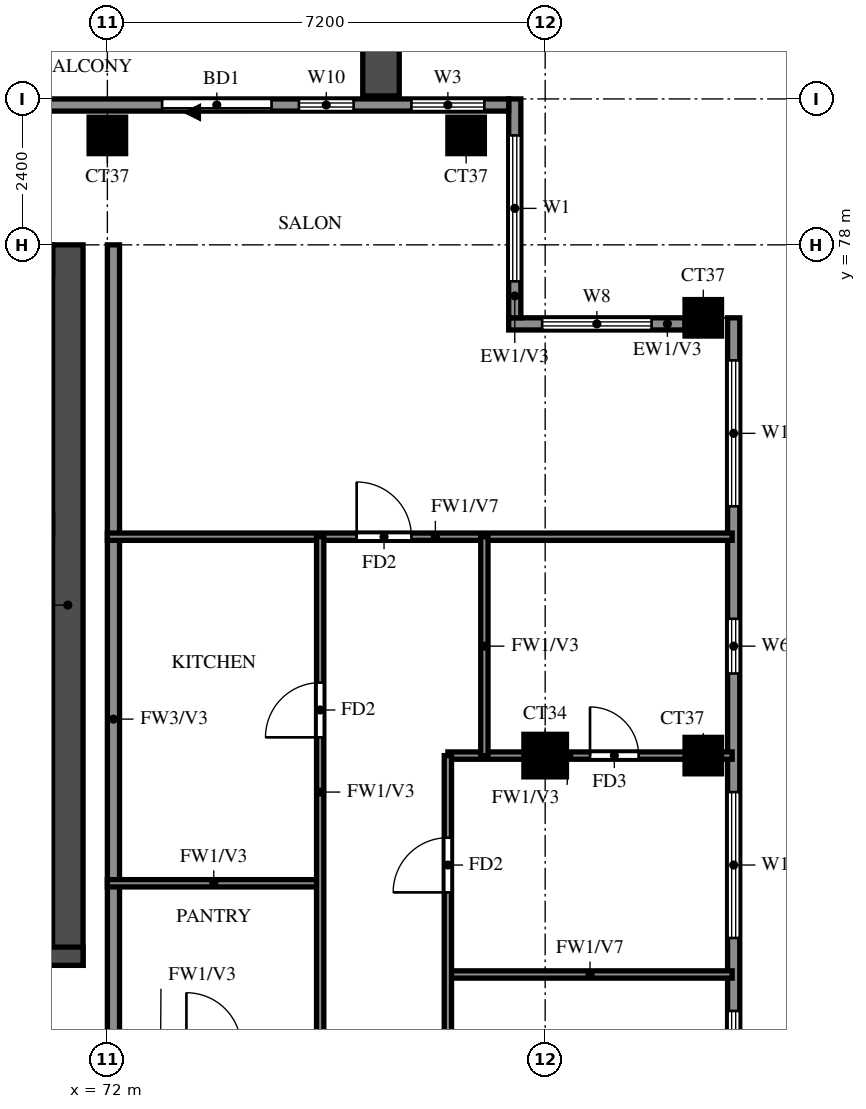
"""IFC4 building model, lengths in metres.
Left out: names, types, materials, properties, quantities, classifications, styles, units other than length and angle.
Written with IfcOpenShell. Run it as: python <this file> out.ifc"""

import sys

from ifc_helpers import new_model, si_unit, direction, frame, frame_2d, origin, origin_2d, place, context, subcontext, project, spatial, rectangle, extrude, source, transform, mapped, element, fill, save


model = new_model("IFC4")
c1 = context("Model", 3, precision=1e-05, world=origin(), true_north=direction((0.0, 1.0)))
c2 = subcontext(c1, "Body", "Model", "MODEL_VIEW")
j1 = project(units=[si_unit("LENGTHUNIT", "METRE"), si_unit("PLANEANGLEUNIT", "RADIAN")], contexts=[c1])
p1 = place(None, origin())
s1 = spatial("IfcSite", under=j1, at=p1, CompositionType="ELEMENT")
p2 = place(p1, origin())
s2 = spatial("IfcBuilding", under=s1, at=p2, CompositionType="ELEMENT")
p3 = place(p2, frame((0.0, 0.0, 260.5)))
s3 = spatial("IfcBuildingStorey", under=s2, at=p3, CompositionType="ELEMENT", Elevation=260.5)
m1 = source(origin(), c2, "Body", "SweptSolid", [
    extrude(rectangle(XDim=0.7, YDim=0.7, at=origin_2d()), origin(), (0.0, 0.0, 1.0), 3.22),
])
p4 = place(p3, frame((79.2, 69.6, 0.0), z_axis=(0.0, 0.0, 1.0), x_axis=(1.0, 0.0, 0.0)))
e1 = element("IfcColumn", 1, at=p4, inside=s3, PredefinedType="COLUMN", context=c2, shape_type="MappedRepresentation", body=[
    mapped(m1, transform((0.0, 0.0, 0.0))),
])
m2 = source(origin(), c2, "Body", "SweptSolid", [
    extrude(rectangle(XDim=0.6, YDim=0.6, at=origin_2d()), origin(), (0.0, 0.0, 1.0), 3.22),
])
for number, where, z_axis, x_axis in (
    (2, (81.8, 69.6, 0.0), (0.0, 0.0, 1.0), (1.0, 0.0, 0.0)),
    (3, (81.8, 76.8, 0.0), (0.0, 0.0, 1.0), (1.0, 0.0, 0.0)),
    (4, (72.0, 79.8, 0.0), (0.0, 0.0, 1.0), (1.0, 0.0, 0.0)),
    (5, (77.9, 79.8, 0.0), (0.0, 0.0, 1.0), (1.0, 0.0, 0.0)),
):
    element("IfcColumn", number, at=place(p3, frame(where, z_axis=z_axis, x_axis=x_axis)), inside=s3, PredefinedType="COLUMN", context=c2, shape_type="MappedRepresentation", body=[
        mapped(m2, transform((0.0, 0.0, 0.0))),
    ])
p5 = place(p3, frame((71.35, 66.15, 0.0), z_axis=(0.0, 0.0, 1.0), x_axis=(0.0, 1.0, 0.0)))
e6 = element("IfcWall", 6, at=p5, inside=s3, PredefinedType="SHEAR", context=c2, shape_type="SweptSolid", body=[
    extrude(rectangle(XDim=11.85, YDim=0.5, at=frame_2d((5.925, 0.0))), origin(), (0.0, 0.0, 1.0), 3.22),
])
p6 = place(p3, frame((29.7, 77.75, 0.0), z_axis=(0.0, 0.0, 1.0), x_axis=(1.0, 0.0, 0.0)))
e7 = element("IfcWall", 7, at=p6, inside=s3, PredefinedType="SHEAR", context=c2, shape_type="SweptSolid", body=[
    extrude(rectangle(XDim=41.4, YDim=0.5, at=frame_2d((20.7, 0.0))), origin(), (0.0, 0.0, 1.0), 3.22),
])
p7 = place(p3, frame((29.2, 66.3, 0.0), z_axis=(0.0, 0.0, 1.0), x_axis=(1.0, 0.0, 0.0)))
e8 = element("IfcWall", 8, at=p7, inside=s3, PredefinedType="SHEAR", context=c2, shape_type="SweptSolid", body=[
    extrude(rectangle(XDim=42.4, YDim=0.3, at=frame_2d((21.2, 0.0))), origin(), (0.0, 0.0, 1.0), 3.22),
])
p8 = place(p7, frame((1.425, 0.0, 0.0)))
e9 = element("IfcOpeningElement", 9, at=p8, cuts=e8, PredefinedType="OPENING", context=c2, shape_type="SweptSolid", body=[
    extrude(rectangle(XDim=1.1, YDim=2.1, at=frame_2d((0.55, 1.05))), frame((0.0, 0.16, 0.0), z_axis=(0.0, -1.0, 0.0), x_axis=(1.0, 0.0, 0.0)), (0.0, 0.0, 1.0), 0.32),
])
p9 = place(p7, frame((4.2, 0.0, 0.0)))
e10 = element("IfcOpeningElement", 10, at=p9, cuts=e8, PredefinedType="OPENING", context=c2, shape_type="SweptSolid", body=[
    extrude(rectangle(XDim=1.8, YDim=2.1, at=frame_2d((0.9, 1.05))), frame((0.0, 0.16, 0.0), z_axis=(0.0, -1.0, 0.0), x_axis=(1.0, 0.0, 0.0)), (0.0, 0.0, 1.0), 0.32),
])
p10 = place(p3, frame((82.3, 48.2, 0.0), z_axis=(0.0, 0.0, 1.0), x_axis=(0.0, 1.0, 0.0)))
e11 = element("IfcWall", 11, at=p10, inside=s3, PredefinedType="SOLIDWALL", context=c2, shape_type="SweptSolid", body=[
    extrude(rectangle(XDim=28.6, YDim=0.2, at=frame_2d((14.3, 0.0))), origin(), (0.0, 0.0, 1.0), 3.22),
])
p11 = place(p10, frame((7.9, 0.0, 0.0)))
e12 = element("IfcOpeningElement", 12, at=p11, cuts=e11, PredefinedType="OPENING", context=c2, shape_type="SweptSolid", body=[
    extrude(rectangle(XDim=1.8, YDim=2.4, at=frame_2d((0.9, 1.2))), frame((0.0, 0.11, 0.0), z_axis=(0.0, -1.0, 0.0), x_axis=(1.0, 0.0, 0.0)), (0.0, 0.0, 1.0), 0.22),
])
p12 = place(p10, frame((0.6, 0.0, 0.6)))
e13 = element("IfcOpeningElement", 13, at=p12, cuts=e11, PredefinedType="OPENING", context=c2, shape_type="SweptSolid", body=[
    extrude(rectangle(XDim=2.4, YDim=2.4, at=frame_2d((1.2, 1.2))), frame((0.0, 0.11, 0.0), z_axis=(0.0, -1.0, 0.0), x_axis=(1.0, 0.0, 0.0)), (0.0, 0.0, 1.0), 0.22),
])
p13 = place(p10, frame((3.55, 0.0, 0.6)))
e14 = element("IfcOpeningElement", 14, at=p13, cuts=e11, PredefinedType="OPENING", context=c2, shape_type="SweptSolid", body=[
    extrude(rectangle(XDim=0.9, YDim=2.4, at=frame_2d((0.45, 1.2))), frame((0.0, 0.11, 0.0), z_axis=(0.0, -1.0, 0.0), x_axis=(1.0, 0.0, 0.0)), (0.0, 0.0, 1.0), 0.22),
])
p14 = place(p10, frame((5.5, 0.0, 0.6)))
e15 = element("IfcOpeningElement", 15, at=p14, cuts=e11, PredefinedType="OPENING", context=c2, shape_type="SweptSolid", body=[
    extrude(rectangle(XDim=1.2, YDim=2.4, at=frame_2d((0.6, 1.2))), frame((0.0, 0.11, 0.0), z_axis=(0.0, -1.0, 0.0), x_axis=(1.0, 0.0, 0.0)), (0.0, 0.0, 1.0), 0.22),
])
p15 = place(p10, frame((10.15, 0.0, 0.6)))
e16 = element("IfcOpeningElement", 16, at=p15, cuts=e11, PredefinedType="OPENING", context=c2, shape_type="SweptSolid", body=[
    extrude(rectangle(XDim=0.9, YDim=2.4, at=frame_2d((0.45, 1.2))), frame((0.0, 0.11, 0.0), z_axis=(0.0, -1.0, 0.0), x_axis=(1.0, 0.0, 0.0)), (0.0, 0.0, 1.0), 0.22),
])
p16 = place(p10, frame((12.1, 0.0, 0.6)))
e17 = element("IfcOpeningElement", 17, at=p16, cuts=e11, PredefinedType="OPENING", context=c2, shape_type="SweptSolid", body=[
    extrude(rectangle(XDim=1.8, YDim=2.4, at=frame_2d((0.9, 1.2))), frame((0.0, 0.11, 0.0), z_axis=(0.0, -1.0, 0.0), x_axis=(1.0, 0.0, 0.0)), (0.0, 0.0, 1.0), 0.22),
])
p17 = place(p10, frame((14.8, 0.0, 0.6)))
e18 = element("IfcOpeningElement", 18, at=p17, cuts=e11, PredefinedType="OPENING", context=c2, shape_type="SweptSolid", body=[
    extrude(rectangle(XDim=2.4, YDim=2.4, at=frame_2d((1.2, 1.2))), frame((0.0, 0.11, 0.0), z_axis=(0.0, -1.0, 0.0), x_axis=(1.0, 0.0, 0.0)), (0.0, 0.0, 1.0), 0.22),
])
p18 = place(p10, frame((18.4, 0.0, 0.6)))
e19 = element("IfcOpeningElement", 19, at=p18, cuts=e11, PredefinedType="OPENING", context=c2, shape_type="SweptSolid", body=[
    extrude(rectangle(XDim=2.4, YDim=2.4, at=frame_2d((1.2, 1.2))), frame((0.0, 0.11, 0.0), z_axis=(0.0, -1.0, 0.0), x_axis=(1.0, 0.0, 0.0)), (0.0, 0.0, 1.0), 0.22),
])
p19 = place(p10, frame((22.75, 0.0, 1.5)))
e20 = element("IfcOpeningElement", 20, at=p19, cuts=e11, PredefinedType="OPENING", context=c2, shape_type="SweptSolid", body=[
    extrude(rectangle(XDim=0.9, YDim=0.9, at=frame_2d((0.45, 0.45))), frame((0.0, 0.11, 0.0), z_axis=(0.0, -1.0, 0.0), x_axis=(1.0, 0.0, 0.0)), (0.0, 0.0, 1.0), 0.22),
])
p20 = place(p10, frame((25.5, 0.0, 0.6)))
e21 = element("IfcOpeningElement", 21, at=p20, cuts=e11, PredefinedType="OPENING", context=c2, shape_type="SweptSolid", body=[
    extrude(rectangle(XDim=2.4, YDim=2.4, at=frame_2d((1.2, 1.2))), frame((0.0, 0.11, 0.0), z_axis=(0.0, -1.0, 0.0), x_axis=(1.0, 0.0, 0.0)), (0.0, 0.0, 1.0), 0.22),
])
p21 = place(p3, frame((81.5, 76.7, 0.0), z_axis=(0.0, 0.0, 1.0), x_axis=(-1.0, 0.0, 0.0)))
e22 = element("IfcWall", 22, at=p21, inside=s3, PredefinedType="SOLIDWALL", context=c2, shape_type="SweptSolid", body=[
    extrude(rectangle(XDim=2.9, YDim=0.2, at=frame_2d((1.45, 0.0))), origin(), (0.0, 0.0, 1.0), 3.22),
])
p22 = place(p21, frame((0.55, 0.0, 0.6)))
e23 = element("IfcOpeningElement", 23, at=p22, cuts=e22, PredefinedType="OPENING", context=c2, shape_type="SweptSolid", body=[
    extrude(rectangle(XDim=1.8, YDim=2.4, at=frame_2d((0.9, 1.2))), frame((0.0, 0.11, 0.0), z_axis=(0.0, -1.0, 0.0), x_axis=(1.0, 0.0, 0.0)), (0.0, 0.0, 1.0), 0.22),
])
p23 = place(p3, frame((78.7, 76.8, 0.0), z_axis=(0.0, 0.0, 1.0), x_axis=(0.0, 1.0, 0.0)))
e24 = element("IfcWall", 24, at=p23, inside=s3, PredefinedType="SOLIDWALL", context=c2, shape_type="SweptSolid", body=[
    extrude(rectangle(XDim=3.6, YDim=0.2, at=frame_2d((1.8, 0.0))), origin(), (0.0, 0.0, 1.0), 3.22),
])
p24 = place(p23, frame((0.6, 0.0, 0.6)))
e25 = element("IfcOpeningElement", 25, at=p24, cuts=e24, PredefinedType="OPENING", context=c2, shape_type="SweptSolid", body=[
    extrude(rectangle(XDim=2.4, YDim=2.4, at=frame_2d((1.2, 1.2))), frame((0.0, 0.11, 0.0), z_axis=(0.0, -1.0, 0.0), x_axis=(1.0, 0.0, 0.0)), (0.0, 0.0, 1.0), 0.22),
])
p25 = place(p3, frame((78.6, 80.3, 0.0), z_axis=(0.0, 0.0, 1.0), x_axis=(-1.0, 0.0, 0.0)))
e26 = element("IfcWall", 26, at=p25, inside=s3, PredefinedType="SOLIDWALL", context=c2, shape_type="SweptSolid", body=[
    extrude(rectangle(XDim=56.6, YDim=0.2, at=frame_2d((28.3, 0.0))), origin(), (0.0, 0.0, 1.0), 3.22),
])
p26 = place(p25, frame((3.9, 0.0, 0.0)))
e27 = element("IfcOpeningElement", 27, at=p26, cuts=e26, PredefinedType="OPENING", context=c2, shape_type="SweptSolid", body=[
    extrude(rectangle(XDim=1.8, YDim=2.4, at=frame_2d((0.9, 1.2))), frame((0.0, 0.11, 0.0), z_axis=(0.0, -1.0, 0.0), x_axis=(1.0, 0.0, 0.0)), (0.0, 0.0, 1.0), 0.22),
])
p27 = place(p25, frame((50.433, 0.0, 0.6)))
e28 = element("IfcOpeningElement", 28, at=p27, cuts=e26, PredefinedType="OPENING", context=c2, shape_type="SweptSolid", body=[
    extrude(rectangle(XDim=2.4, YDim=2.4, at=frame_2d((1.2, 1.2))), frame((0.0, 0.11, 0.0), z_axis=(0.0, -1.0, 0.0), x_axis=(1.0, 0.0, 0.0)), (0.0, 0.0, 1.0), 0.22),
])
p28 = place(p25, frame((53.367, 0.0, 0.6)))
e29 = element("IfcOpeningElement", 29, at=p28, cuts=e26, PredefinedType="OPENING", context=c2, shape_type="SweptSolid", body=[
    extrude(rectangle(XDim=2.4, YDim=2.4, at=frame_2d((1.2, 1.2))), frame((0.0, 0.11, 0.0), z_axis=(0.0, -1.0, 0.0), x_axis=(1.0, 0.0, 0.0)), (0.0, 0.0, 1.0), 0.22),
])
p29 = place(p25, frame((0.4, 0.0, 0.6)))
e30 = element("IfcOpeningElement", 30, at=p29, cuts=e26, PredefinedType="OPENING", context=c2, shape_type="SweptSolid", body=[
    extrude(rectangle(XDim=1.2, YDim=2.4, at=frame_2d((0.6, 1.2))), frame((0.0, 0.11, 0.0), z_axis=(0.0, -1.0, 0.0), x_axis=(1.0, 0.0, 0.0)), (0.0, 0.0, 1.0), 0.22),
])
p30 = place(p25, frame((2.55, 0.0, 0.6)))
e31 = element("IfcOpeningElement", 31, at=p30, cuts=e26, PredefinedType="OPENING", context=c2, shape_type="SweptSolid", body=[
    extrude(rectangle(XDim=0.9, YDim=2.4, at=frame_2d((0.45, 1.2))), frame((0.0, 0.11, 0.0), z_axis=(0.0, -1.0, 0.0), x_axis=(1.0, 0.0, 0.0)), (0.0, 0.0, 1.0), 0.22),
])
p31 = place(p3, frame((76.5, 80.45, 0.0), z_axis=(0.0, 0.0, 1.0), x_axis=(0.0, 1.0, 0.0)))
e32 = element("IfcWall", 32, at=p31, inside=s3, PredefinedType="SOLIDWALL", context=c2, shape_type="SweptSolid", body=[
    extrude(rectangle(XDim=2.65, YDim=0.6, at=frame_2d((1.325, 0.0))), origin(), (0.0, 0.0, 1.0), 2.85),
])
p32 = place(p3, frame((72.1, 62.4, 0.0), z_axis=(0.0, 0.0, 1.0), x_axis=(0.0, 1.0, 0.0)))
e33 = element("IfcWall", 33, at=p32, inside=s3, PredefinedType="SOLIDWALL", context=c2, shape_type="SweptSolid", body=[
    extrude(rectangle(XDim=15.6, YDim=0.2, at=frame_2d((7.8, 0.0))), origin(), (0.0, 0.0, 1.0), 3.22),
])
p33 = place(p3, frame((77.6, 66.0, 0.0), z_axis=(0.0, 0.0, 1.0), x_axis=(1.0, 0.0, 0.0)))
e34 = element("IfcWall", 34, at=p33, inside=s3, PredefinedType="PARTITIONING", context=c2, shape_type="SweptSolid", body=[
    extrude(rectangle(XDim=4.675, YDim=0.12, at=frame_2d((2.337, 0.0))), origin(), (0.0, 0.0, 1.0), 2.32),
])
p34 = place(p3, frame((72.0, 67.5, 0.0), z_axis=(0.0, 0.0, 1.0), x_axis=(1.0, 0.0, 0.0)))
e35 = element("IfcWall", 35, at=p34, inside=s3, PredefinedType="PARTITIONING", context=c2, shape_type="SweptSolid", body=[
    extrude(rectangle(XDim=3.5, YDim=0.12, at=frame_2d((1.75, 0.0))), origin(), (0.0, 0.0, 1.0), 3.22),
])
p35 = place(p3, frame((77.6, 69.6, 0.0), z_axis=(0.0, 0.0, 1.0), x_axis=(1.0, 0.0, 0.0)))
e36 = element("IfcWall", 36, at=p35, inside=s3, PredefinedType="PARTITIONING", context=c2, shape_type="SweptSolid", body=[
    extrude(rectangle(XDim=4.675, YDim=0.12, at=frame_2d((2.337, 0.0))), origin(), (0.0, 0.0, 1.0), 3.22),
])
p36 = place(p35, frame((2.337, 0.0, 0.0)))
e37 = element("IfcOpeningElement", 37, at=p36, cuts=e36, PredefinedType="OPENING", context=c2, shape_type="SweptSolid", body=[
    extrude(rectangle(XDim=0.8, YDim=2.1, at=frame_2d((0.4, 1.05))), frame((0.0, 0.07, 0.0), z_axis=(0.0, -1.0, 0.0), x_axis=(1.0, 0.0, 0.0)), (0.0, 0.0, 1.0), 0.14),
])
p37 = place(p3, frame((72.0, 73.2, 0.0), z_axis=(0.0, 0.0, 1.0), x_axis=(1.0, 0.0, 0.0)))
e38 = element("IfcWall", 38, at=p37, inside=s3, PredefinedType="PARTITIONING", context=c2, shape_type="SweptSolid", body=[
    extrude(rectangle(XDim=10.275, YDim=0.12, at=frame_2d((5.137, 0.0))), origin(), (0.0, 0.0, 1.0), 2.32),
])
p38 = place(p37, frame((4.1, 0.0, 0.0)))
e39 = element("IfcOpeningElement", 39, at=p38, cuts=e38, PredefinedType="OPENING", context=c2, shape_type="SweptSolid", body=[
    extrude(rectangle(XDim=0.9, YDim=2.1, at=frame_2d((0.45, 1.05))), frame((0.0, 0.07, 0.0), z_axis=(0.0, -1.0, 0.0), x_axis=(1.0, 0.0, 0.0)), (0.0, 0.0, 1.0), 0.14),
])
p39 = place(p3, frame((75.5, 64.8, 0.0), z_axis=(0.0, 0.0, 1.0), x_axis=(0.0, 1.0, 0.0)))
e40 = element("IfcWall", 40, at=p39, inside=s3, PredefinedType="PARTITIONING", context=c2, shape_type="SweptSolid", body=[
    extrude(rectangle(XDim=8.4, YDim=0.12, at=frame_2d((4.2, 0.0))), origin(), (0.0, 0.0, 1.0), 3.22),
])
p40 = place(p39, frame((5.1, 0.0, 0.0)))
e41 = element("IfcOpeningElement", 41, at=p40, cuts=e40, PredefinedType="OPENING", context=c2, shape_type="SweptSolid", body=[
    extrude(rectangle(XDim=0.9, YDim=2.1, at=frame_2d((0.45, 1.05))), frame((0.0, 0.07, 0.0), z_axis=(0.0, -1.0, 0.0), x_axis=(1.0, 0.0, 0.0)), (0.0, 0.0, 1.0), 0.14),
])
p41 = place(p3, frame((77.6, 48.125, 0.0), z_axis=(0.0, 0.0, 1.0), x_axis=(0.0, 1.0, 0.0)))
e42 = element("IfcWall", 42, at=p41, inside=s3, PredefinedType="PARTITIONING", context=c2, shape_type="SweptSolid", body=[
    extrude(rectangle(XDim=21.475, YDim=0.12, at=frame_2d((10.738, 0.0))), origin(), (0.0, 0.0, 1.0), 3.22),
])
p42 = place(p41, frame((1.288, 0.0, 0.0)))
e43 = element("IfcOpeningElement", 43, at=p42, cuts=e42, PredefinedType="OPENING", context=c2, shape_type="SweptSolid", body=[
    extrude(rectangle(XDim=0.9, YDim=2.1, at=frame_2d((0.45, 1.05))), frame((0.0, 0.07, 0.0), z_axis=(0.0, -1.0, 0.0), x_axis=(1.0, 0.0, 0.0)), (0.0, 0.0, 1.0), 0.14),
])
p43 = place(p41, frame((4.825, 0.0, 0.0)))
e44 = element("IfcOpeningElement", 44, at=p43, cuts=e42, PredefinedType="OPENING", context=c2, shape_type="SweptSolid", body=[
    extrude(rectangle(XDim=0.9, YDim=2.1, at=frame_2d((0.45, 1.05))), frame((0.0, 0.07, 0.0), z_axis=(0.0, -1.0, 0.0), x_axis=(1.0, 0.0, 0.0)), (0.0, 0.0, 1.0), 0.14),
])
p44 = place(p41, frame((9.925, 0.0, 0.0)))
e45 = element("IfcOpeningElement", 45, at=p44, cuts=e42, PredefinedType="OPENING", context=c2, shape_type="SweptSolid", body=[
    extrude(rectangle(XDim=1.5, YDim=2.1, at=frame_2d((0.75, 1.05))), frame((0.0, 0.07, 0.0), z_axis=(0.0, -1.0, 0.0), x_axis=(1.0, 0.0, 0.0)), (0.0, 0.0, 1.0), 0.14),
])
p45 = place(p41, frame((15.625, 0.0, 0.0)))
e46 = element("IfcOpeningElement", 46, at=p45, cuts=e42, PredefinedType="OPENING", context=c2, shape_type="SweptSolid", body=[
    extrude(rectangle(XDim=0.9, YDim=2.1, at=frame_2d((0.45, 1.05))), frame((0.0, 0.07, 0.0), z_axis=(0.0, -1.0, 0.0), x_axis=(1.0, 0.0, 0.0)), (0.0, 0.0, 1.0), 0.14),
])
p46 = place(p41, frame((19.225, 0.0, 0.0)))
e47 = element("IfcOpeningElement", 47, at=p46, cuts=e42, PredefinedType="OPENING", context=c2, shape_type="SweptSolid", body=[
    extrude(rectangle(XDim=0.9, YDim=2.1, at=frame_2d((0.45, 1.05))), frame((0.0, 0.07, 0.0), z_axis=(0.0, -1.0, 0.0), x_axis=(1.0, 0.0, 0.0)), (0.0, 0.0, 1.0), 0.14),
])
p47 = place(p3, frame((78.2, 69.6, 0.0), z_axis=(0.0, 0.0, 1.0), x_axis=(0.0, 1.0, 0.0)))
e48 = element("IfcWall", 48, at=p47, inside=s3, PredefinedType="PARTITIONING", context=c2, shape_type="SweptSolid", body=[
    extrude(rectangle(XDim=3.6, YDim=0.12, at=frame_2d((1.8, 0.0))), origin(), (0.0, 0.0, 1.0), 3.22),
])
p48 = place(p17, origin())
e49 = element("IfcWindow", 49, at=p48, inside=s3, PartitioningType="DOUBLE_PANEL_VERTICAL", PredefinedType="WINDOW", context=c2, shape_type="SweptSolid", body=[
    extrude(rectangle(XDim=2.4, YDim=2.4, at=frame_2d((1.2, 1.2))), frame((0.0, 0.03, 0.0), z_axis=(0.0, -1.0, 0.0), x_axis=(1.0, 0.0, 0.0)), (0.0, 0.0, 1.0), 0.06),
])
fill(e18, e49)
p49 = place(p18, origin())
e50 = element("IfcWindow", 50, at=p49, inside=s3, PartitioningType="DOUBLE_PANEL_VERTICAL", PredefinedType="WINDOW", context=c2, shape_type="SweptSolid", body=[
    extrude(rectangle(XDim=2.4, YDim=2.4, at=frame_2d((1.2, 1.2))), frame((0.0, 0.03, 0.0), z_axis=(0.0, -1.0, 0.0), x_axis=(1.0, 0.0, 0.0)), (0.0, 0.0, 1.0), 0.06),
])
fill(e19, e50)
p50 = place(p19, origin())
e51 = element("IfcWindow", 51, at=p50, inside=s3, PartitioningType="SINGLE_PANEL", PredefinedType="WINDOW", context=c2, shape_type="SweptSolid", body=[
    extrude(rectangle(XDim=0.9, YDim=0.9, at=frame_2d((0.45, 0.45))), frame((0.0, 0.03, 0.0), z_axis=(0.0, -1.0, 0.0), x_axis=(1.0, 0.0, 0.0)), (0.0, 0.0, 1.0), 0.06),
])
fill(e20, e51)
p51 = place(p20, origin())
e52 = element("IfcWindow", 52, at=p51, inside=s3, PartitioningType="DOUBLE_PANEL_VERTICAL", PredefinedType="WINDOW", context=c2, shape_type="SweptSolid", body=[
    extrude(rectangle(XDim=2.4, YDim=2.4, at=frame_2d((1.2, 1.2))), frame((0.0, 0.03, 0.0), z_axis=(0.0, -1.0, 0.0), x_axis=(1.0, 0.0, 0.0)), (0.0, 0.0, 1.0), 0.06),
])
fill(e21, e52)
p52 = place(p22, origin())
e53 = element("IfcWindow", 53, at=p52, inside=s3, PartitioningType="DOUBLE_PANEL_VERTICAL", PredefinedType="WINDOW", context=c2, shape_type="SweptSolid", body=[
    extrude(rectangle(XDim=1.8, YDim=2.4, at=frame_2d((0.9, 1.2))), frame((0.0, 0.03, 0.0), z_axis=(0.0, -1.0, 0.0), x_axis=(1.0, 0.0, 0.0)), (0.0, 0.0, 1.0), 0.06),
])
fill(e23, e53)
p53 = place(p24, origin())
e54 = element("IfcWindow", 54, at=p53, inside=s3, PartitioningType="DOUBLE_PANEL_VERTICAL", PredefinedType="WINDOW", context=c2, shape_type="SweptSolid", body=[
    extrude(rectangle(XDim=2.4, YDim=2.4, at=frame_2d((1.2, 1.2))), frame((0.0, 0.03, 0.0), z_axis=(0.0, -1.0, 0.0), x_axis=(1.0, 0.0, 0.0)), (0.0, 0.0, 1.0), 0.06),
])
fill(e25, e54)
p54 = place(p26, origin())
e55 = element("IfcDoor", 55, at=p54, inside=s3, OperationType="DOUBLE_DOOR_SLIDING", PredefinedType="DOOR", context=c2, shape_type="SweptSolid", body=[
    extrude(rectangle(XDim=1.8, YDim=2.4, at=frame_2d((0.9, 1.2))), frame((0.0, 0.025, 0.0), z_axis=(0.0, -1.0, 0.0), x_axis=(1.0, 0.0, 0.0)), (0.0, 0.0, 1.0), 0.05),
])
fill(e27, e55)
p55 = place(p29, origin())
e56 = element("IfcWindow", 56, at=p55, inside=s3, PartitioningType="SINGLE_PANEL", PredefinedType="WINDOW", context=c2, shape_type="SweptSolid", body=[
    extrude(rectangle(XDim=1.2, YDim=2.4, at=frame_2d((0.6, 1.2))), frame((0.0, 0.03, 0.0), z_axis=(0.0, -1.0, 0.0), x_axis=(1.0, 0.0, 0.0)), (0.0, 0.0, 1.0), 0.06),
])
fill(e30, e56)
p56 = place(p30, origin())
e57 = element("IfcWindow", 57, at=p56, inside=s3, PartitioningType="SINGLE_PANEL", PredefinedType="WINDOW", context=c2, shape_type="SweptSolid", body=[
    extrude(rectangle(XDim=0.9, YDim=2.4, at=frame_2d((0.45, 1.2))), frame((0.0, 0.03, 0.0), z_axis=(0.0, -1.0, 0.0), x_axis=(1.0, 0.0, 0.0)), (0.0, 0.0, 1.0), 0.06),
])
fill(e31, e57)
p57 = place(p46, origin())
e58 = element("IfcDoor", 58, at=p57, inside=s3, OperationType="SINGLE_SWING_LEFT", PredefinedType="DOOR", context=c2, shape_type="SweptSolid", body=[
    extrude(rectangle(XDim=0.9, YDim=2.1, at=frame_2d((0.45, 1.05))), frame((0.0, 0.025, 0.0), z_axis=(0.0, -1.0, 0.0), x_axis=(1.0, 0.0, 0.0)), (0.0, 0.0, 1.0), 0.05),
])
fill(e47, e58)
p58 = place(p36, origin())
e59 = element("IfcDoor", 59, at=p58, inside=s3, OperationType="SINGLE_SWING_LEFT", PredefinedType="DOOR", context=c2, shape_type="SweptSolid", body=[
    extrude(rectangle(XDim=0.8, YDim=2.1, at=frame_2d((0.4, 1.05))), frame((0.0, 0.025, 0.0), z_axis=(0.0, -1.0, 0.0), x_axis=(1.0, 0.0, 0.0)), (0.0, 0.0, 1.0), 0.05),
])
fill(e37, e59)
p59 = place(p38, origin())
e60 = element("IfcDoor", 60, at=p59, inside=s3, OperationType="SINGLE_SWING_LEFT", PredefinedType="DOOR", context=c2, shape_type="SweptSolid", body=[
    extrude(rectangle(XDim=0.9, YDim=2.1, at=frame_2d((0.45, 1.05))), frame((0.0, 0.025, 0.0), z_axis=(0.0, -1.0, 0.0), x_axis=(1.0, 0.0, 0.0)), (0.0, 0.0, 1.0), 0.05),
])
fill(e39, e60)
p60 = place(p40, origin())
e61 = element("IfcDoor", 61, at=p60, inside=s3, OperationType="SINGLE_SWING_RIGHT", PredefinedType="DOOR", context=c2, shape_type="SweptSolid", body=[
    extrude(rectangle(XDim=0.9, YDim=2.1, at=frame_2d((0.45, 1.05))), frame((0.0, 0.025, 0.0), z_axis=(0.0, -1.0, 0.0), x_axis=(1.0, 0.0, 0.0)), (0.0, 0.0, 1.0), 0.05),
])
fill(e41, e61)
save(model, sys.argv[1])
